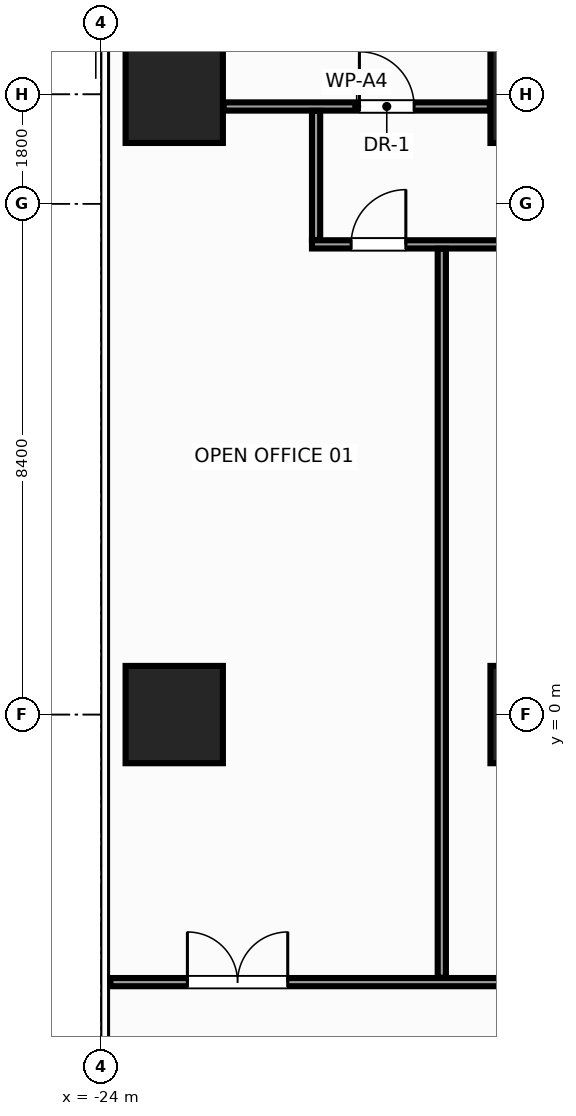
"""IFC4 building model, lengths in metres.
Left out: names, types, materials, properties, quantities, classifications, styles, units other than length and angle.
Written with IfcOpenShell. Run it as: python <this file> out.ifc"""

import sys

from ifc_helpers import new_model, si_unit, direction, frame, frame_2d, origin, origin_2d, place, context, subcontext, project, spatial, rectangle, extrude, source, transform, mapped, element, fill, save


model = new_model("IFC4")
c1 = context("Model", 3, precision=1e-05, world=origin(), true_north=direction((0.0, 1.0)))
c2 = subcontext(c1, "Body", "Model", "MODEL_VIEW")
j1 = project(units=[si_unit("LENGTHUNIT", "METRE"), si_unit("PLANEANGLEUNIT", "RADIAN")], contexts=[c1])
p1 = place(None, origin())
s1 = spatial("IfcSite", under=j1, at=p1, CompositionType="ELEMENT")
p2 = place(p1, origin())
s2 = spatial("IfcBuilding", under=s1, at=p2, CompositionType="ELEMENT")
p3 = place(p2, frame((0.0, 0.0, 131.6)))
s3 = spatial("IfcBuildingStorey", under=s2, at=p3, CompositionType="ELEMENT", Elevation=131.6)
m1 = source(origin(), c2, "Body", "SweptSolid", [
    extrude(rectangle(XDim=1.6, YDim=1.6, at=origin_2d()), origin(), (0.0, 0.0, 1.0), 3.6),
])
for number, where, z_axis, x_axis in (
    (1, (-16.8, 0.0, 0.0), (0.0, 0.0, 1.0), (1.0, 0.0, 0.0)),
    (2, (-16.8, 10.2, 0.0), (0.0, 0.0, 1.0), (1.0, 0.0, 0.0)),
    (3, (-22.8, 0.0, 0.0), (0.0, 0.0, 1.0), (1.0, 0.0, 0.0)),
    (4, (-22.8, 10.2, 0.0), (0.0, 0.0, 1.0), (1.0, 0.0, 0.0)),
):
    element("IfcColumn", number, at=place(p3, frame(where, z_axis=z_axis, x_axis=x_axis)), inside=s3, PredefinedType="COLUMN", context=c2, shape_type="MappedRepresentation", body=[
        mapped(m1, transform((0.0, 0.0, 0.0), x_axis=(1.0, 0.0, 0.0), y_axis=(0.0, 1.0, 0.0), z_axis=(0.0, 0.0, 1.0), scale=1.0)),
    ])
m2 = source(origin(), c2, "Body", "SweptSolid", [
    extrude(rectangle(XDim=4.38, YDim=0.135, at=frame_2d((2.19, 0.0))), origin(), (0.0, 0.0, 1.0), 2.915),
])
p4 = place(p3, frame((-21.99, 10.0, 0.0), z_axis=(0.0, 0.0, 1.0), x_axis=(1.0, 0.0, 0.0)))
e5 = element("IfcWall", 5, at=p4, inside=s3, PredefinedType="PARTITIONING", context=c2, shape_type="MappedRepresentation", body=[
    mapped(m2, transform((0.0, 0.0, 0.0), x_axis=(1.0, 0.0, 0.0), y_axis=(0.0, 1.0, 0.0), z_axis=(0.0, 0.0, 1.0), scale=1.0)),
])
p5 = place(p4, frame((2.235, 0.0, 0.0)))
e6 = element("IfcOpeningElement", 6, at=p5, cuts=e5, PredefinedType="OPENING", context=c2, shape_type="SweptSolid", body=[
    extrude(rectangle(XDim=0.9, YDim=2.15, at=frame_2d((0.45, 1.075))), frame((0.0, 0.08, 0.0), z_axis=(0.0, -1.0, 0.0), x_axis=(1.0, 0.0, 0.0)), (0.0, 0.0, 1.0), 0.159),
])
m3 = source(origin(), c2, "Body", "SweptSolid", [
    extrude(rectangle(XDim=31.6, YDim=0.135, at=frame_2d((15.8, 0.0))), origin(), (0.0, 0.0, 1.0), 2.765),
])
p6 = place(p3, frame((-20.535, 7.732, 0.0), z_axis=(0.0, 0.0, 1.0), x_axis=(1.0, 0.0, 0.0)))
e7 = element("IfcWall", 7, at=p6, inside=s3, PredefinedType="PARTITIONING", context=c2, shape_type="MappedRepresentation", body=[
    mapped(m3, transform((0.0, 0.0, 0.0), x_axis=(1.0, 0.0, 0.0), y_axis=(0.0, 1.0, 0.0), z_axis=(0.0, 0.0, 1.0), scale=1.0)),
])
p7 = place(p6, frame((0.644, 0.0, 0.0)))
e8 = element("IfcOpeningElement", 8, at=p7, cuts=e7, PredefinedType="OPENING", context=c2, shape_type="SweptSolid", body=[
    extrude(rectangle(XDim=0.9, YDim=2.15, at=frame_2d((0.45, 1.075))), frame((0.0, 0.08, 0.0), z_axis=(0.0, -1.0, 0.0), x_axis=(1.0, 0.0, 0.0)), (0.0, 0.0, 1.0), 0.159),
])
p8 = place(p6, frame((5.21, 0.0, 0.0)))
e9 = element("IfcOpeningElement", 9, at=p8, cuts=e7, PredefinedType="OPENING", context=c2, shape_type="SweptSolid", body=[
    extrude(rectangle(XDim=1.65, YDim=2.35, at=frame_2d((0.825, 1.175))), frame((0.0, 0.08, 0.0), z_axis=(0.0, -1.0, 0.0), x_axis=(1.0, 0.0, 0.0)), (0.0, 0.0, 1.0), 0.159),
])
p9 = place(p6, frame((11.41, 0.0, 0.0)))
e10 = element("IfcOpeningElement", 10, at=p9, cuts=e7, PredefinedType="OPENING", context=c2, shape_type="SweptSolid", body=[
    extrude(rectangle(XDim=1.65, YDim=2.35, at=frame_2d((0.825, 1.175))), frame((0.0, 0.08, 0.0), z_axis=(0.0, -1.0, 0.0), x_axis=(1.0, 0.0, 0.0)), (0.0, 0.0, 1.0), 0.159),
])
p10 = place(p6, frame((19.91, 0.0, 0.0)))
e11 = element("IfcOpeningElement", 11, at=p10, cuts=e7, PredefinedType="OPENING", context=c2, shape_type="SweptSolid", body=[
    extrude(rectangle(XDim=1.65, YDim=2.35, at=frame_2d((0.825, 1.175))), frame((0.0, 0.08, 0.0), z_axis=(0.0, -1.0, 0.0), x_axis=(1.0, 0.0, 0.0)), (0.0, 0.0, 1.0), 0.159),
])
p11 = place(p6, frame((27.316, 0.0, 0.0)))
e12 = element("IfcOpeningElement", 12, at=p11, cuts=e7, PredefinedType="OPENING", context=c2, shape_type="SweptSolid", body=[
    extrude(rectangle(XDim=1.65, YDim=2.35, at=frame_2d((0.825, 1.175))), frame((0.0, 0.08, 0.0), z_axis=(0.0, -1.0, 0.0), x_axis=(1.0, 0.0, 0.0)), (0.0, 0.0, 1.0), 0.159),
])
m4 = source(origin(), c2, "Body", "SweptSolid", [
    extrude(rectangle(XDim=2.123, YDim=0.135, at=frame_2d((1.061, 0.0))), origin(), (0.0, 0.0, 1.0), 3.38),
])
p12 = place(p3, frame((-20.468, 7.805, 0.0), z_axis=(0.0, 0.0, 1.0), x_axis=(0.0, 1.0, 0.0)))
e13 = element("IfcWall", 13, at=p12, inside=s3, PredefinedType="PARTITIONING", context=c2, shape_type="MappedRepresentation", body=[
    mapped(m4, transform((0.0, 0.0, 0.0), x_axis=(1.0, 0.0, 0.0), y_axis=(0.0, 1.0, 0.0), z_axis=(0.0, 0.0, 1.0), scale=1.0)),
])
m5 = source(origin(), c2, "Body", "SweptSolid", [
    extrude(rectangle(XDim=34.91, YDim=0.135, at=frame_2d((17.455, 0.0))), origin(), (0.0, 0.0, 1.0), 2.765),
])
p13 = place(p3, frame((-23.85, -4.4, 0.0), z_axis=(0.0, 0.0, 1.0), x_axis=(1.0, 0.0, 0.0)))
e14 = element("IfcWall", 14, at=p13, inside=s3, PredefinedType="PARTITIONING", context=c2, shape_type="MappedRepresentation", body=[
    mapped(m5, transform((0.0, 0.0, 0.0), x_axis=(1.0, 0.0, 0.0), y_axis=(0.0, 1.0, 0.0), z_axis=(0.0, 0.0, 1.0), scale=1.0)),
])
p14 = place(p13, frame((1.266, 0.0, 0.0)))
e15 = element("IfcOpeningElement", 15, at=p14, cuts=e14, PredefinedType="OPENING", context=c2, shape_type="SweptSolid", body=[
    extrude(rectangle(XDim=1.65, YDim=2.35, at=frame_2d((0.825, 1.175))), frame((0.0, 0.08, 0.0), z_axis=(0.0, -1.0, 0.0), x_axis=(1.0, 0.0, 0.0)), (0.0, 0.0, 1.0), 0.159),
])
p15 = place(p13, frame((8.725, 0.0, 0.0)))
e16 = element("IfcOpeningElement", 16, at=p15, cuts=e14, PredefinedType="OPENING", context=c2, shape_type="SweptSolid", body=[
    extrude(rectangle(XDim=1.65, YDim=2.35, at=frame_2d((0.825, 1.175))), frame((0.0, 0.08, 0.0), z_axis=(0.0, -1.0, 0.0), x_axis=(1.0, 0.0, 0.0)), (0.0, 0.0, 1.0), 0.159),
])
p16 = place(p13, frame((23.325, 0.0, 0.0)))
e17 = element("IfcOpeningElement", 17, at=p16, cuts=e14, PredefinedType="OPENING", context=c2, shape_type="SweptSolid", body=[
    extrude(rectangle(XDim=1.65, YDim=2.35, at=frame_2d((0.825, 1.175))), frame((0.0, 0.08, 0.0), z_axis=(0.0, -1.0, 0.0), x_axis=(1.0, 0.0, 0.0)), (0.0, 0.0, 1.0), 0.159),
])
m6 = source(origin(), c2, "Body", "SweptSolid", [
    extrude(rectangle(XDim=11.987, YDim=0.135, at=frame_2d((5.994, 0.0))), origin(), (0.0, 0.0, 1.0), 2.915),
])
p17 = place(p3, frame((-18.4, -4.327, 0.0), z_axis=(0.0, 0.0, 1.0), x_axis=(0.0, 1.0, 0.0)))
e18 = element("IfcWall", 18, at=p17, inside=s3, PredefinedType="PARTITIONING", context=c2, shape_type="MappedRepresentation", body=[
    mapped(m6, transform((0.0, 0.0, 0.0), x_axis=(1.0, 0.0, 0.0), y_axis=(0.0, 1.0, 0.0), z_axis=(0.0, 0.0, 1.0), scale=1.0)),
])
m7 = source(origin(), c2, "Body", "SweptSolid", [
    extrude(rectangle(XDim=0.9, YDim=2.15, at=frame_2d((0.45, 1.075))), frame((0.0, 0.025, 0.0), z_axis=(0.0, -1.0, 0.0), x_axis=(1.0, 0.0, 0.0)), (0.0, 0.0, 1.0), 0.05),
])
p18 = place(p5, origin())
e19 = element("IfcDoor", 19, at=p18, inside=s3, OperationType="SINGLE_SWING_LEFT", PredefinedType="DOOR", context=c2, shape_type="MappedRepresentation", body=[
    mapped(m7, transform((0.0, 0.0, 0.0), x_axis=(1.0, 0.0, 0.0), y_axis=(0.0, 1.0, 0.0), z_axis=(0.0, 0.0, 1.0), scale=1.0)),
])
fill(e6, e19)
p19 = place(p7, origin())
e20 = element("IfcDoor", 20, at=p19, inside=s3, OperationType="SINGLE_SWING_RIGHT", PredefinedType="DOOR", context=c2, shape_type="MappedRepresentation", body=[
    mapped(m7, transform((0.0, 0.0, 0.0), x_axis=(1.0, 0.0, 0.0), y_axis=(0.0, 1.0, 0.0), z_axis=(0.0, 0.0, 1.0), scale=1.0)),
])
fill(e8, e20)
m8 = source(origin(), c2, "Body", "SweptSolid", [
    extrude(rectangle(XDim=1.65, YDim=2.35, at=frame_2d((0.825, 1.175))), frame((0.0, 0.025, 0.0), z_axis=(0.0, -1.0, 0.0), x_axis=(1.0, 0.0, 0.0)), (0.0, 0.0, 1.0), 0.05),
])
p20 = place(p14, origin())
e21 = element("IfcDoor", 21, at=p20, inside=s3, OperationType="DOUBLE_DOOR_SINGLE_SWING", PredefinedType="DOOR", context=c2, shape_type="MappedRepresentation", body=[
    mapped(m8, transform((0.0, 0.0, 0.0), x_axis=(1.0, 0.0, 0.0), y_axis=(0.0, 1.0, 0.0), z_axis=(0.0, 0.0, 1.0), scale=1.0)),
])
fill(e15, e21)
save(model, sys.argv[1])
